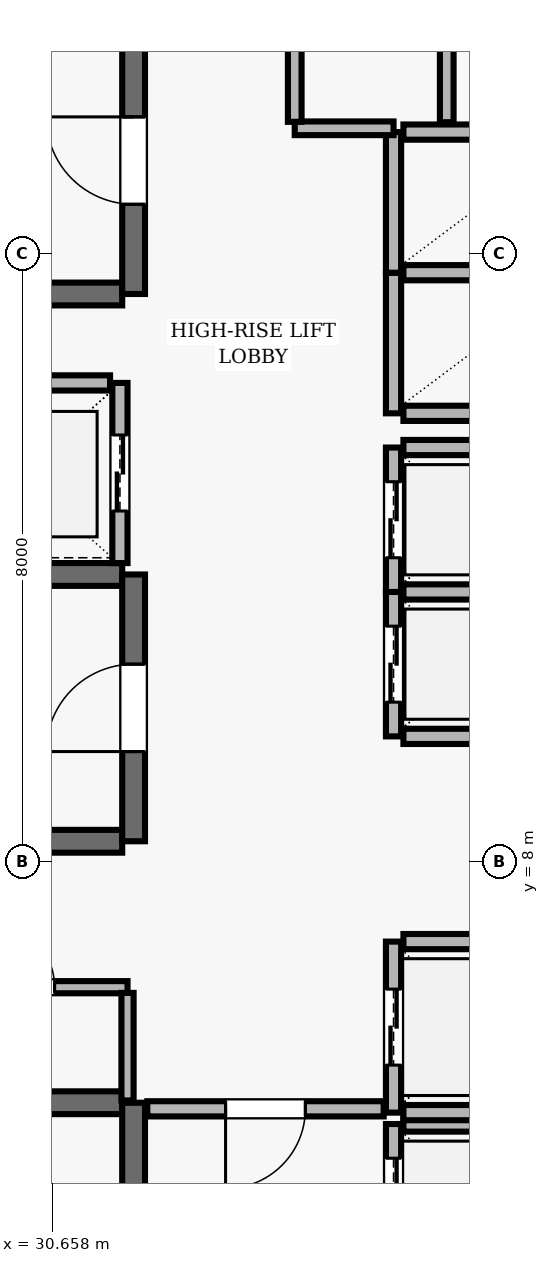
"""IFC4 building model, lengths in metres.
Left out: names, types, materials, properties, quantities, classifications, styles, units other than length and angle.
Written with IfcOpenShell. Run it as: python <this file> out.ifc"""

import sys

from ifc_helpers import new_model, si_unit, direction, frame, frame_2d, origin, place, context, subcontext, project, spatial, rectangle, extrude, element, fill, save


model = new_model("IFC4")
c1 = context("Model", 3, precision=1e-05, world=origin(), true_north=direction((0.0, 1.0)))
c2 = subcontext(c1, "Body", "Model", "MODEL_VIEW")
j1 = project(units=[si_unit("LENGTHUNIT", "METRE"), si_unit("PLANEANGLEUNIT", "RADIAN")], contexts=[c1])
p1 = place(None, origin())
s1 = spatial("IfcSite", under=j1, at=p1, CompositionType="ELEMENT")
p2 = place(p1, origin())
s2 = spatial("IfcBuilding", under=s1, at=p2, CompositionType="ELEMENT")
p3 = place(p2, frame((0.0, 0.0, 267.7)))
s3 = spatial("IfcBuildingStorey", under=s2, at=p3, CompositionType="ELEMENT", Elevation=267.7)
p4 = place(p3, frame((31.58, 4.83, 0.0), z_axis=(0.0, 0.0, 1.0), x_axis=(-1.0, 0.0, 0.0)))
e1 = element("IfcWall", 1, at=p4, inside=s3, PredefinedType="SHEAR", context=c2, shape_type="SweptSolid", body=[
    extrude(rectangle(XDim=8.36, YDim=0.3, at=frame_2d((4.18, 0.0))), origin(), (0.0, 0.0, 1.0), 3.69),
])
p5 = place(p3, frame((31.73, 0.96, 0.0), z_axis=(0.0, 0.0, 1.0), x_axis=(0.0, 1.0, 0.0)))
e2 = element("IfcWall", 2, at=p5, inside=s3, PredefinedType="SHEAR", context=c2, shape_type="SweptSolid", body=[
    extrude(rectangle(XDim=3.87, YDim=0.3, at=frame_2d((1.935, 0.0))), origin(), (0.0, 0.0, 1.0), 3.69),
])
p6 = place(p5, frame((1.54, 0.0, 0.0)))
e3 = element("IfcOpeningElement", 3, at=p6, cuts=e2, PredefinedType="OPENING", context=c2, shape_type="SweptSolid", body=[
    extrude(rectangle(XDim=1.15, YDim=2.15, at=frame_2d((0.575, 1.075))), frame((0.0, 0.16, 0.0), z_axis=(0.0, -1.0, 0.0), x_axis=(1.0, 0.0, 0.0)), (0.0, 0.0, 1.0), 0.32),
])
p7 = place(p3, frame((23.22, 15.47, 0.0), z_axis=(0.0, 0.0, 1.0), x_axis=(1.0, 0.0, 0.0)))
e4 = element("IfcWall", 4, at=p7, inside=s3, PredefinedType="SHEAR", context=c2, shape_type="SweptSolid", body=[
    extrude(rectangle(XDim=8.36, YDim=0.3, at=frame_2d((4.18, 0.0))), origin(), (0.0, 0.0, 1.0), 3.69),
])
p8 = place(p3, frame((31.73, 15.47, 0.0), z_axis=(0.0, 0.0, 1.0), x_axis=(0.0, 1.0, 0.0)))
e5 = element("IfcWall", 5, at=p8, inside=s3, PredefinedType="SHEAR", context=c2, shape_type="SweptSolid", body=[
    extrude(rectangle(XDim=3.51, YDim=0.3, at=frame_2d((1.755, 0.0))), origin(), (0.0, 0.0, 1.0), 3.69),
])
p9 = place(p8, frame((1.18, 0.0, 0.0)))
e6 = element("IfcOpeningElement", 6, at=p9, cuts=e5, PredefinedType="OPENING", context=c2, shape_type="SweptSolid", body=[
    extrude(rectangle(XDim=1.15, YDim=2.15, at=frame_2d((0.575, 1.075))), frame((0.0, 0.16, 0.0), z_axis=(0.0, -1.0, 0.0), x_axis=(1.0, 0.0, 0.0)), (0.0, 0.0, 1.0), 0.32),
])
for number, where, z_axis, x_axis in (
    (7, (31.58, 11.78, 0.0), (0.0, 0.0, 1.0), (-1.0, 0.0, 0.0)),
    (8, (23.22, 8.27, 0.0), (0.0, 0.0, 1.0), (1.0, 0.0, 0.0)),
):
    element("IfcWall", number, at=place(p3, frame(where, z_axis=z_axis, x_axis=x_axis)), inside=s3, PredefinedType="SHEAR", context=c2, shape_type="SweptSolid", body=[
        extrude(rectangle(XDim=8.36, YDim=0.3, at=frame_2d((4.18, 0.0))), origin(), (0.0, 0.0, 1.0), 3.69),
    ])
p10 = place(p3, frame((31.73, 8.27, 0.0), z_axis=(0.0, 0.0, 1.0), x_axis=(0.0, 1.0, 0.0)))
e9 = element("IfcWall", 9, at=p10, inside=s3, PredefinedType="SHEAR", context=c2, shape_type="SweptSolid", body=[
    extrude(rectangle(XDim=3.51, YDim=0.3, at=frame_2d((1.755, 0.0))), origin(), (0.0, 0.0, 1.0), 3.69),
])
p11 = place(p10, frame((1.18, 0.0, 0.0)))
e10 = element("IfcOpeningElement", 10, at=p11, cuts=e9, PredefinedType="OPENING", context=c2, shape_type="SweptSolid", body=[
    extrude(rectangle(XDim=1.15, YDim=2.15, at=frame_2d((0.575, 1.075))), frame((0.0, 0.16, 0.0), z_axis=(0.0, -1.0, 0.0), x_axis=(1.0, 0.0, 0.0)), (0.0, 0.0, 1.0), 0.32),
])
p12 = place(p3, frame((35.15, 4.55, 0.0), z_axis=(0.0, 0.0, 1.0), x_axis=(0.0, -1.0, 0.0)))
e11 = element("IfcWall", 11, at=p12, inside=s3, PredefinedType="SOLIDWALL", context=c2, shape_type="SweptSolid", body=[
    extrude(rectangle(XDim=2.1, YDim=0.2, at=frame_2d((1.05, 0.0))), origin(), (0.0, 0.0, 1.0), 3.69),
])
p13 = place(p12, frame((0.45, 0.0, 0.0)))
e12 = element("IfcOpeningElement", 12, at=p13, cuts=e11, PredefinedType="OPENING", context=c2, shape_type="SweptSolid", body=[
    extrude(rectangle(XDim=1.2, YDim=2.15, at=frame_2d((0.6, 1.075))), frame((0.0, 0.11, 0.0), z_axis=(0.0, -1.0, 0.0), x_axis=(1.0, 0.0, 0.0)), (0.0, 0.0, 1.0), 0.22),
])
p14 = place(p3, frame((37.42, 4.55, 0.0), z_axis=(0.0, 0.0, 1.0), x_axis=(-1.0, 0.0, 0.0)))
e13 = element("IfcWall", 13, at=p14, inside=s3, PredefinedType="SOLIDWALL", context=c2, shape_type="SweptSolid", body=[
    extrude(rectangle(XDim=2.14, YDim=0.2, at=frame_2d((1.07, 0.0))), origin(), (0.0, 0.0, 1.0), 3.69),
])
p15 = place(p3, frame((35.15, 6.95, 0.0), z_axis=(0.0, 0.0, 1.0), x_axis=(0.0, -1.0, 0.0)))
e14 = element("IfcWall", 14, at=p15, inside=s3, PredefinedType="SOLIDWALL", context=c2, shape_type="SweptSolid", body=[
    extrude(rectangle(XDim=2.25, YDim=0.2, at=frame_2d((1.125, 0.0))), origin(), (0.0, 0.0, 1.0), 3.69),
])
p16 = place(p15, frame((0.625, 0.0, 0.0)))
e15 = element("IfcOpeningElement", 15, at=p16, cuts=e14, PredefinedType="OPENING", context=c2, shape_type="SweptSolid", body=[
    extrude(rectangle(XDim=1.0, YDim=2.1, at=frame_2d((0.5, 1.05))), frame((0.0, 0.11, 0.0), z_axis=(0.0, -1.0, 0.0), x_axis=(1.0, 0.0, 0.0)), (0.0, 0.0, 1.0), 0.22),
])
for number, where, z_axis, x_axis in (
    (16, (35.28, 4.7, 0.0), (0.0, 0.0, 1.0), (1.0, 0.0, 0.0)),
    (17, (37.42, 6.95, 0.0), (0.0, 0.0, 1.0), (-1.0, 0.0, 0.0)),
):
    element("IfcWall", number, at=place(p3, frame(where, z_axis=z_axis, x_axis=x_axis)), inside=s3, PredefinedType="SOLIDWALL", context=c2, shape_type="SweptSolid", body=[
        extrude(rectangle(XDim=2.14, YDim=0.2, at=frame_2d((1.07, 0.0))), origin(), (0.0, 0.0, 1.0), 3.69),
    ])
p17 = place(p3, frame((35.15, 11.55, 0.0), z_axis=(0.0, 0.0, 1.0), x_axis=(0.0, -1.0, 0.0)))
e18 = element("IfcWall", 18, at=p17, inside=s3, PredefinedType="SOLIDWALL", context=c2, shape_type="SweptSolid", body=[
    extrude(rectangle(XDim=1.9, YDim=0.2, at=frame_2d((0.95, 0.0))), origin(), (0.0, 0.0, 1.0), 3.69),
])
p18 = place(p17, frame((0.45, 0.0, 0.0)))
e19 = element("IfcOpeningElement", 19, at=p18, cuts=e18, PredefinedType="OPENING", context=c2, shape_type="SweptSolid", body=[
    extrude(rectangle(XDim=1.0, YDim=2.1, at=frame_2d((0.5, 1.05))), frame((0.0, 0.11, 0.0), z_axis=(0.0, -1.0, 0.0), x_axis=(1.0, 0.0, 0.0)), (0.0, 0.0, 1.0), 0.22),
])
for number, where, z_axis, x_axis in (
    (20, (35.28, 9.65, 0.0), (0.0, 0.0, 1.0), (1.0, 0.0, 0.0)),
    (21, (37.42, 11.55, 0.0), (0.0, 0.0, 1.0), (-1.0, 0.0, 0.0)),
):
    element("IfcWall", number, at=place(p3, frame(where, z_axis=z_axis, x_axis=x_axis)), inside=s3, PredefinedType="SOLIDWALL", context=c2, shape_type="SweptSolid", body=[
        extrude(rectangle(XDim=2.14, YDim=0.2, at=frame_2d((1.07, 0.0))), origin(), (0.0, 0.0, 1.0), 3.69),
    ])
p19 = place(p3, frame((35.15, 13.45, 0.0), z_axis=(0.0, 0.0, 1.0), x_axis=(0.0, -1.0, 0.0)))
e22 = element("IfcWall", 22, at=p19, inside=s3, PredefinedType="SOLIDWALL", context=c2, shape_type="SweptSolid", body=[
    extrude(rectangle(XDim=1.9, YDim=0.2, at=frame_2d((0.95, 0.0))), origin(), (0.0, 0.0, 1.0), 3.69),
])
p20 = place(p19, frame((0.45, 0.0, 0.0)))
e23 = element("IfcOpeningElement", 23, at=p20, cuts=e22, PredefinedType="OPENING", context=c2, shape_type="SweptSolid", body=[
    extrude(rectangle(XDim=1.0, YDim=2.1, at=frame_2d((0.5, 1.05))), frame((0.0, 0.11, 0.0), z_axis=(0.0, -1.0, 0.0), x_axis=(1.0, 0.0, 0.0)), (0.0, 0.0, 1.0), 0.22),
])
p21 = place(p3, frame((37.42, 13.45, 0.0), z_axis=(0.0, 0.0, 1.0), x_axis=(-1.0, 0.0, 0.0)))
e24 = element("IfcWall", 24, at=p21, inside=s3, PredefinedType="SOLIDWALL", context=c2, shape_type="SweptSolid", body=[
    extrude(rectangle(XDim=2.14, YDim=0.2, at=frame_2d((1.07, 0.0))), origin(), (0.0, 0.0, 1.0), 3.69),
])
p22 = place(p3, frame((31.55, 11.93, 0.0), z_axis=(0.0, 0.0, 1.0), x_axis=(0.0, 1.0, 0.0)))
e25 = element("IfcWall", 25, at=p22, inside=s3, PredefinedType="SOLIDWALL", context=c2, shape_type="SweptSolid", body=[
    extrude(rectangle(XDim=2.37, YDim=0.2, at=frame_2d((1.185, 0.0))), origin(), (0.0, 0.0, 1.0), 3.69),
])
p23 = place(p22, frame((0.685, 0.0, 0.0)))
e26 = element("IfcOpeningElement", 26, at=p23, cuts=e25, PredefinedType="OPENING", context=c2, shape_type="SweptSolid", body=[
    extrude(rectangle(XDim=1.0, YDim=2.1, at=frame_2d((0.5, 1.05))), frame((0.0, 0.11, 0.0), z_axis=(0.0, -1.0, 0.0), x_axis=(1.0, 0.0, 0.0)), (0.0, 0.0, 1.0), 0.22),
])
p24 = place(p3, frame((31.42, 14.3, 0.0), z_axis=(0.0, 0.0, 1.0), x_axis=(-1.0, 0.0, 0.0)))
e27 = element("IfcWall", 27, at=p24, inside=s3, PredefinedType="SOLIDWALL", context=c2, shape_type="SweptSolid", body=[
    extrude(rectangle(XDim=2.44, YDim=0.2, at=frame_2d((1.22, 0.0))), origin(), (0.0, 0.0, 1.0), 3.69),
])
p25 = place(p3, frame((35.15, 15.75, 0.0), z_axis=(0.0, 0.0, 1.0), x_axis=(0.0, -1.0, 0.0)))
e28 = element("IfcWall", 28, at=p25, inside=s3, PredefinedType="SOLIDWALL", context=c2, shape_type="SweptSolid", body=[
    extrude(rectangle(XDim=1.85, YDim=0.2, at=frame_2d((0.925, 0.0))), origin(), (0.0, 0.0, 1.0), 3.69),
])
for number, where, z_axis, x_axis in (
    (29, (35.28, 13.9, 0.0), (0.0, 0.0, 1.0), (1.0, 0.0, 0.0)),
    (30, (37.42, 15.75, 0.0), (0.0, 0.0, 1.0), (-1.0, 0.0, 0.0)),
):
    element("IfcWall", number, at=place(p3, frame(where, z_axis=z_axis, x_axis=x_axis)), inside=s3, PredefinedType="SOLIDWALL", context=c2, shape_type="SweptSolid", body=[
        extrude(rectangle(XDim=2.14, YDim=0.2, at=frame_2d((1.07, 0.0))), origin(), (0.0, 0.0, 1.0), 3.69),
    ])
p26 = place(p3, frame((35.15, 17.6, 0.0), z_axis=(0.0, 0.0, 1.0), x_axis=(0.0, -1.0, 0.0)))
e31 = element("IfcWall", 31, at=p26, inside=s3, PredefinedType="SOLIDWALL", context=c2, shape_type="SweptSolid", body=[
    extrude(rectangle(XDim=1.85, YDim=0.2, at=frame_2d((0.925, 0.0))), origin(), (0.0, 0.0, 1.0), 3.69),
])
p27 = place(p3, frame((37.42, 17.6, 0.0), z_axis=(0.0, 0.0, 1.0), x_axis=(-1.0, 0.0, 0.0)))
e32 = element("IfcWall", 32, at=p27, inside=s3, PredefinedType="SOLIDWALL", context=c2, shape_type="SweptSolid", body=[
    extrude(rectangle(XDim=2.14, YDim=0.2, at=frame_2d((1.07, 0.0))), origin(), (0.0, 0.0, 1.0), 3.69),
])
p28 = place(p3, frame((28.85, 6.35, 0.0), z_axis=(0.0, 0.0, 1.0), x_axis=(1.0, 0.0, 0.0)))
e33 = element("IfcWall", 33, at=p28, inside=s3, PredefinedType="PARTITIONING", context=c2, shape_type="SweptSolid", body=[
    extrude(rectangle(XDim=2.8, YDim=0.16, at=frame_2d((1.4, 0.0))), origin(), (0.0, 0.0, 1.0), 3.69),
])
p29 = place(p28, frame((0.96, 0.0, 0.0)))
e34 = element("IfcOpeningElement", 34, at=p29, cuts=e33, PredefinedType="OPENING", context=c2, shape_type="SweptSolid", body=[
    extrude(rectangle(XDim=0.88, YDim=2.1, at=frame_2d((0.44, 1.05))), frame((0.0, 0.09, 0.0), z_axis=(0.0, -1.0, 0.0), x_axis=(1.0, 0.0, 0.0)), (0.0, 0.0, 1.0), 0.18),
])
p30 = place(p3, frame((33.85, 17.65, 0.0), z_axis=(0.0, 0.0, 1.0), x_axis=(1.0, 0.0, 0.0)))
e35 = element("IfcWall", 35, at=p30, inside=s3, PredefinedType="PARTITIONING", context=c2, shape_type="SweptSolid", body=[
    extrude(rectangle(XDim=1.3, YDim=0.18, at=frame_2d((0.65, 0.0))), origin(), (0.0, 0.0, 1.0), 3.69),
])
p31 = place(p3, frame((35.02, 4.75, 0.0), z_axis=(0.0, 0.0, 1.0), x_axis=(-1.0, 0.0, 0.0)))
e36 = element("IfcWall", 36, at=p31, inside=s3, PredefinedType="SOLIDWALL", context=c2, shape_type="SweptSolid", body=[
    extrude(rectangle(XDim=3.11, YDim=0.2, at=frame_2d((1.555, 0.0))), origin(), (0.0, 0.0, 1.0), 3.69),
])
p32 = place(p31, frame((1.03, 0.0, 0.0)))
e37 = element("IfcOpeningElement", 37, at=p32, cuts=e36, PredefinedType="OPENING", context=c2, shape_type="SweptSolid", body=[
    extrude(rectangle(XDim=1.05, YDim=2.15, at=frame_2d((0.525, 1.075))), frame((0.0, 0.11, 0.0), z_axis=(0.0, -1.0, 0.0), x_axis=(1.0, 0.0, 0.0)), (0.0, 0.0, 1.0), 0.22),
])
p33 = place(p3, frame((31.65, 4.86, 0.0), z_axis=(0.0, 0.0, 1.0), x_axis=(0.0, 1.0, 0.0)))
e38 = element("IfcWall", 38, at=p33, inside=s3, PredefinedType="PARTITIONING", context=c2, shape_type="SweptSolid", body=[
    extrude(rectangle(XDim=1.415, YDim=0.16, at=frame_2d((0.708, 0.0))), origin(), (0.0, 0.0, 1.0), 3.69),
])
p34 = place(p3, frame((33.85, 17.735, 0.0), z_axis=(0.0, 0.0, 1.0), x_axis=(0.0, 1.0, 0.0)))
e39 = element("IfcWall", 39, at=p34, inside=s3, PredefinedType="PARTITIONING", context=c2, shape_type="SweptSolid", body=[
    extrude(rectangle(XDim=6.03, YDim=0.18, at=frame_2d((3.015, 0.0))), origin(), (0.0, 0.0, 1.0), 3.69),
])
p35 = place(p34, frame((2.54, 0.0, 0.0)))
e40 = element("IfcOpeningElement", 40, at=p35, cuts=e39, PredefinedType="OPENING", context=c2, shape_type="SweptSolid", body=[
    extrude(rectangle(XDim=0.95, YDim=2.1, at=frame_2d((0.475, 1.05))), frame((0.0, 0.1, 0.0), z_axis=(0.0, -1.0, 0.0), x_axis=(1.0, 0.0, 0.0)), (0.0, 0.0, 1.0), 0.2),
])
p36 = place(p3, frame((35.85, 17.73, 0.0), z_axis=(0.0, 0.0, 1.0), x_axis=(0.0, 1.0, 0.0)))
e41 = element("IfcWall", 41, at=p36, inside=s3, PredefinedType="PARTITIONING", context=c2, shape_type="SweptSolid", body=[
    extrude(rectangle(XDim=3.412, YDim=0.18, at=frame_2d((1.706, 0.0))), origin(), (0.0, 0.0, 1.0), 3.69),
])
p37 = place(p36, frame((1.256, 0.0, 0.0)))
e42 = element("IfcOpeningElement", 42, at=p37, cuts=e41, PredefinedType="OPENING", context=c2, shape_type="SweptSolid", body=[
    extrude(rectangle(XDim=0.9, YDim=2.1, at=frame_2d((0.45, 1.05))), frame((0.0, 0.1, 0.0), z_axis=(0.0, -1.0, 0.0), x_axis=(1.0, 0.0, 0.0)), (0.0, 0.0, 1.0), 0.2),
])
p38 = place(p9, origin())
e43 = element("IfcDoor", 43, at=p38, inside=s3, OperationType="SINGLE_SWING_RIGHT", PredefinedType="DOOR", context=c2, shape_type="SweptSolid", body=[
    extrude(rectangle(XDim=1.15, YDim=2.15, at=frame_2d((0.575, 1.075))), frame((0.0, 0.025, 0.0), z_axis=(0.0, -1.0, 0.0), x_axis=(1.0, 0.0, 0.0)), (0.0, 0.0, 1.0), 0.05),
])
fill(e6, e43)
p39 = place(p11, origin())
e44 = element("IfcDoor", 44, at=p39, inside=s3, OperationType="SINGLE_SWING_LEFT", PredefinedType="DOOR", context=c2, shape_type="SweptSolid", body=[
    extrude(rectangle(XDim=1.15, YDim=2.15, at=frame_2d((0.575, 1.075))), frame((0.0, 0.025, 0.0), z_axis=(0.0, -1.0, 0.0), x_axis=(1.0, 0.0, 0.0)), (0.0, 0.0, 1.0), 0.05),
])
fill(e10, e44)
p40 = place(p13, origin())
e45 = element("IfcDoor", 45, at=p40, inside=s3, OperationType="DOUBLE_DOOR_SLIDING", PredefinedType="DOOR", context=c2, shape_type="SweptSolid", body=[
    extrude(rectangle(XDim=1.2, YDim=2.15, at=frame_2d((0.6, 1.075))), frame((0.0, 0.025, 0.0), z_axis=(0.0, -1.0, 0.0), x_axis=(1.0, 0.0, 0.0)), (0.0, 0.0, 1.0), 0.05),
])
fill(e12, e45)
p41 = place(p16, origin())
e46 = element("IfcDoor", 46, at=p41, inside=s3, OperationType="DOUBLE_DOOR_SLIDING", PredefinedType="DOOR", context=c2, shape_type="SweptSolid", body=[
    extrude(rectangle(XDim=1.0, YDim=2.1, at=frame_2d((0.5, 1.05))), frame((0.0, 0.025, 0.0), z_axis=(0.0, -1.0, 0.0), x_axis=(1.0, 0.0, 0.0)), (0.0, 0.0, 1.0), 0.05),
])
fill(e15, e46)
p42 = place(p18, origin())
e47 = element("IfcDoor", 47, at=p42, inside=s3, OperationType="DOUBLE_DOOR_SLIDING", PredefinedType="DOOR", context=c2, shape_type="SweptSolid", body=[
    extrude(rectangle(XDim=1.0, YDim=2.1, at=frame_2d((0.5, 1.05))), frame((0.0, 0.025, 0.0), z_axis=(0.0, -1.0, 0.0), x_axis=(1.0, 0.0, 0.0)), (0.0, 0.0, 1.0), 0.05),
])
fill(e19, e47)
p43 = place(p20, origin())
e48 = element("IfcDoor", 48, at=p43, inside=s3, OperationType="DOUBLE_DOOR_SLIDING", PredefinedType="DOOR", context=c2, shape_type="SweptSolid", body=[
    extrude(rectangle(XDim=1.0, YDim=2.1, at=frame_2d((0.5, 1.05))), frame((0.0, 0.025, 0.0), z_axis=(0.0, -1.0, 0.0), x_axis=(1.0, 0.0, 0.0)), (0.0, 0.0, 1.0), 0.05),
])
fill(e23, e48)
p44 = place(p23, origin())
e49 = element("IfcDoor", 49, at=p44, inside=s3, OperationType="DOUBLE_DOOR_SLIDING", PredefinedType="DOOR", context=c2, shape_type="SweptSolid", body=[
    extrude(rectangle(XDim=1.0, YDim=2.1, at=frame_2d((0.5, 1.05))), frame((0.0, 0.025, 0.0), z_axis=(0.0, -1.0, 0.0), x_axis=(1.0, 0.0, 0.0)), (0.0, 0.0, 1.0), 0.05),
])
fill(e26, e49)
p45 = place(p32, origin())
e50 = element("IfcDoor", 50, at=p45, inside=s3, OperationType="SINGLE_SWING_RIGHT", PredefinedType="DOOR", context=c2, shape_type="SweptSolid", body=[
    extrude(rectangle(XDim=1.05, YDim=2.15, at=frame_2d((0.525, 1.075))), frame((0.0, 0.025, 0.0), z_axis=(0.0, -1.0, 0.0), x_axis=(1.0, 0.0, 0.0)), (0.0, 0.0, 1.0), 0.05),
])
fill(e37, e50)
p46 = place(p29, origin())
e51 = element("IfcDoor", 51, at=p46, inside=s3, OperationType="SINGLE_SWING_LEFT", PredefinedType="DOOR", context=c2, shape_type="SweptSolid", body=[
    extrude(rectangle(XDim=0.88, YDim=2.1, at=frame_2d((0.44, 1.05))), frame((0.0, 0.025, 0.0), z_axis=(0.0, -1.0, 0.0), x_axis=(1.0, 0.0, 0.0)), (0.0, 0.0, 1.0), 0.05),
])
fill(e34, e51)
save(model, sys.argv[1])
